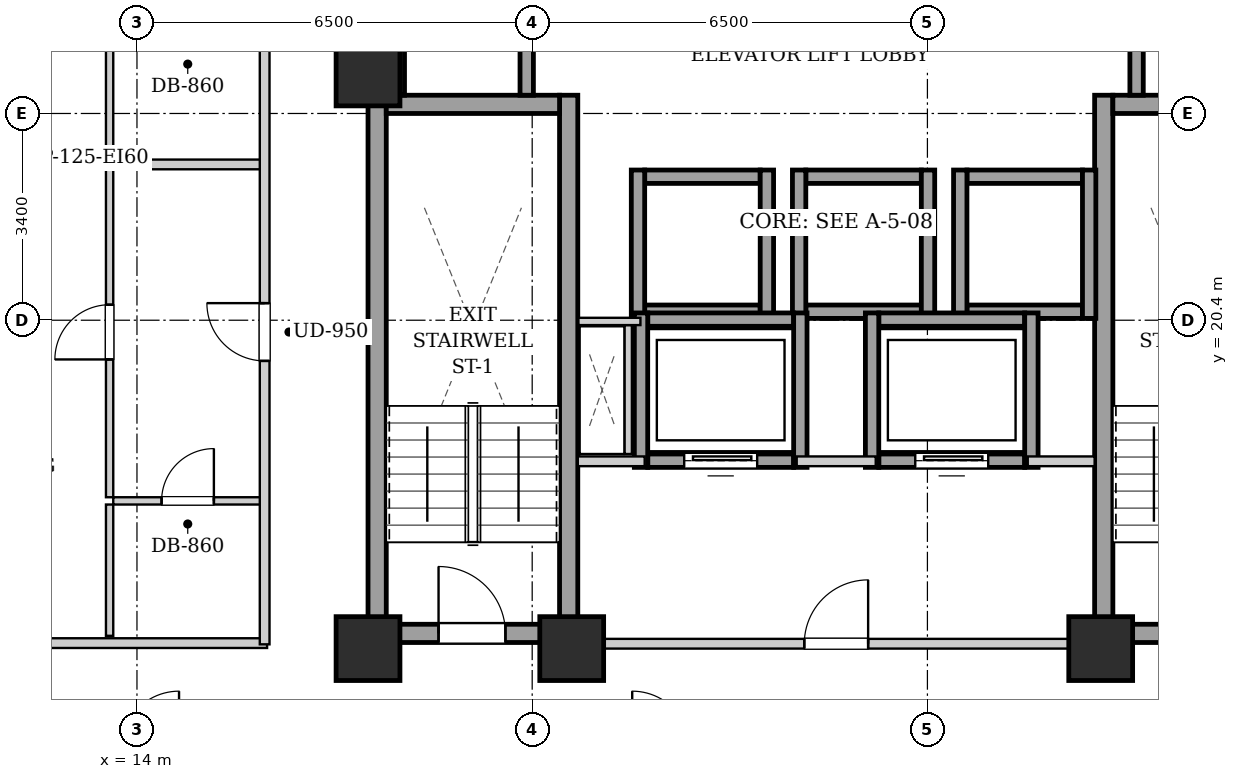
"""IFC4 building model, lengths in metres.
Left out: names, types, materials, properties, quantities, classifications, styles, units other than length and angle.
Written with IfcOpenShell. Run it as: python <this file> out.ifc"""

import sys

from ifc_helpers import new_model, si_unit, direction, frame, frame_2d, origin, origin_2d, place, context, subcontext, project, spatial, rectangle, extrude, element, fill, save


model = new_model("IFC4")
c1 = context("Model", 3, precision=1e-05, world=origin(), true_north=direction((0.0, 1.0)))
c2 = subcontext(c1, "Body", "Model", "MODEL_VIEW")
j1 = project(units=[si_unit("LENGTHUNIT", "METRE"), si_unit("PLANEANGLEUNIT", "RADIAN")], contexts=[c1])
p1 = place(None, origin())
s1 = spatial("IfcSite", under=j1, at=p1, CompositionType="ELEMENT")
p2 = place(p1, origin())
s2 = spatial("IfcBuilding", under=s1, at=p2, CompositionType="ELEMENT")
p3 = place(p2, frame((0.0, 0.0, 113.5)))
s3 = spatial("IfcBuildingStorey", under=s2, at=p3, CompositionType="ELEMENT", Elevation=113.5)
for number, where, z_axis, x_axis in (
    (1, (17.8, 15.0, 0.0), (0.0, 0.0, 1.0), (1.0, 0.0, 0.0)),
    (2, (21.15, 15.0, 0.0), (0.0, 0.0, 1.0), (1.0, 0.0, 0.0)),
    (3, (29.85, 15.0, 0.0), (0.0, 0.0, 1.0), (1.0, 0.0, 0.0)),
    (4, (17.8, 24.45, 0.0), (0.0, 0.0, 1.0), (1.0, 0.0, 0.0)),
):
    element("IfcColumn", number, at=place(p3, frame(where, z_axis=z_axis, x_axis=x_axis)), inside=s3, PredefinedType="COLUMN", context=c2, shape_type="SweptSolid", body=[
        extrude(rectangle(XDim=1.05, YDim=1.05, at=origin_2d()), origin(), (0.0, 0.0, 1.0), 3.2),
    ])
for number, where, z_axis, x_axis in (
    (5, (17.95, 15.1, 0.0), (0.0, 0.0, 1.0), (0.0, 1.0, 0.0)),
    (6, (21.1, 15.1, 0.0), (0.0, 0.0, 1.0), (0.0, 1.0, 0.0)),
):
    element("IfcWall", number, at=place(p3, frame(where, z_axis=z_axis, x_axis=x_axis)), inside=s3, PredefinedType="SHEAR", context=c2, shape_type="SweptSolid", body=[
        extrude(rectangle(XDim=9.0, YDim=0.3, at=frame_2d((4.5, 0.0))), origin(), (0.0, 0.0, 1.0), 2.94),
    ])
p4 = place(p3, frame((18.1, 23.95, 0.0), z_axis=(0.0, 0.0, 1.0), x_axis=(1.0, 0.0, 0.0)))
e7 = element("IfcWall", 7, at=p4, inside=s3, PredefinedType="SHEAR", context=c2, shape_type="SweptSolid", body=[
    extrude(rectangle(XDim=2.85, YDim=0.3, at=frame_2d((1.425, 0.0))), origin(), (0.0, 0.0, 1.0), 2.94),
])
p5 = place(p3, frame((18.1, 15.25, 0.0), z_axis=(0.0, 0.0, 1.0), x_axis=(1.0, 0.0, 0.0)))
e8 = element("IfcWall", 8, at=p5, inside=s3, PredefinedType="SHEAR", context=c2, shape_type="SweptSolid", body=[
    extrude(rectangle(XDim=2.85, YDim=0.3, at=frame_2d((1.425, 0.0))), origin(), (0.0, 0.0, 1.0), 2.94),
])
p6 = place(p5, frame((0.86, 0.0, 0.0)))
e9 = element("IfcOpeningElement", 9, at=p6, cuts=e8, PredefinedType="OPENING", context=c2, shape_type="SweptSolid", body=[
    extrude(rectangle(XDim=1.1, YDim=2.05, at=frame_2d((0.55, 1.025))), frame((0.0, 0.16, 0.0), z_axis=(0.0, -1.0, 0.0), x_axis=(1.0, 0.0, 0.0)), (0.0, 0.0, 1.0), 0.32),
])
p7 = place(p3, frame((29.9, 15.1, 0.0), z_axis=(0.0, 0.0, 1.0), x_axis=(0.0, 1.0, 0.0)))
e10 = element("IfcWall", 10, at=p7, inside=s3, PredefinedType="SHEAR", context=c2, shape_type="SweptSolid", body=[
    extrude(rectangle(XDim=9.0, YDim=0.3, at=frame_2d((4.5, 0.0))), origin(), (0.0, 0.0, 1.0), 2.94),
])
p8 = place(p3, frame((30.05, 23.95, 0.0), z_axis=(0.0, 0.0, 1.0), x_axis=(1.0, 0.0, 0.0)))
e11 = element("IfcWall", 11, at=p8, inside=s3, PredefinedType="SHEAR", context=c2, shape_type="SweptSolid", body=[
    extrude(rectangle(XDim=2.85, YDim=0.3, at=frame_2d((1.425, 0.0))), origin(), (0.0, 0.0, 1.0), 2.94),
])
p9 = place(p3, frame((30.05, 15.25, 0.0), z_axis=(0.0, 0.0, 1.0), x_axis=(1.0, 0.0, 0.0)))
e12 = element("IfcWall", 12, at=p9, inside=s3, PredefinedType="SHEAR", context=c2, shape_type="SweptSolid", body=[
    extrude(rectangle(XDim=2.85, YDim=0.3, at=frame_2d((1.425, 0.0))), origin(), (0.0, 0.0, 1.0), 2.94),
])
p10 = place(p9, frame((0.86, 0.0, 0.0)))
e13 = element("IfcOpeningElement", 13, at=p10, cuts=e12, PredefinedType="OPENING", context=c2, shape_type="SweptSolid", body=[
    extrude(rectangle(XDim=1.1, YDim=2.05, at=frame_2d((0.55, 1.025))), frame((0.0, 0.16, 0.0), z_axis=(0.0, -1.0, 0.0), x_axis=(1.0, 0.0, 0.0)), (0.0, 0.0, 1.0), 0.32),
])
for number, where, z_axis, x_axis in (
    (14, (22.35, 20.54, 0.0), (0.0, 0.0, 1.0), (1.0, 0.0, 0.0)),
    (15, (22.35, 22.76, 0.0), (0.0, 0.0, 1.0), (1.0, 0.0, 0.0)),
):
    element("IfcWall", number, at=place(p3, frame(where, z_axis=z_axis, x_axis=x_axis)), inside=s3, PredefinedType="SHEAR", context=c2, shape_type="SweptSolid", body=[
        extrude(rectangle(XDim=1.9, YDim=0.22, at=frame_2d((0.95, 0.0))), origin(), (0.0, 0.0, 1.0), 2.94),
    ])
for number, where, z_axis, x_axis in (
    (16, (22.24, 20.43, 0.0), (0.0, 0.0, 1.0), (0.0, 1.0, 0.0)),
    (17, (24.36, 20.43, 0.0), (0.0, 0.0, 1.0), (0.0, 1.0, 0.0)),
):
    element("IfcWall", number, at=place(p3, frame(where, z_axis=z_axis, x_axis=x_axis)), inside=s3, PredefinedType="SHEAR", context=c2, shape_type="SweptSolid", body=[
        extrude(rectangle(XDim=2.44, YDim=0.22, at=frame_2d((1.22, 0.0))), origin(), (0.0, 0.0, 1.0), 2.94),
    ])
for number, where, z_axis, x_axis in (
    (18, (25.0, 20.54, 0.0), (0.0, 0.0, 1.0), (1.0, 0.0, 0.0)),
    (19, (25.0, 22.76, 0.0), (0.0, 0.0, 1.0), (1.0, 0.0, 0.0)),
):
    element("IfcWall", number, at=place(p3, frame(where, z_axis=z_axis, x_axis=x_axis)), inside=s3, PredefinedType="SHEAR", context=c2, shape_type="SweptSolid", body=[
        extrude(rectangle(XDim=1.9, YDim=0.22, at=frame_2d((0.95, 0.0))), origin(), (0.0, 0.0, 1.0), 2.94),
    ])
for number, where, z_axis, x_axis in (
    (20, (24.89, 20.43, 0.0), (0.0, 0.0, 1.0), (0.0, 1.0, 0.0)),
    (21, (27.01, 20.43, 0.0), (0.0, 0.0, 1.0), (0.0, 1.0, 0.0)),
):
    element("IfcWall", number, at=place(p3, frame(where, z_axis=z_axis, x_axis=x_axis)), inside=s3, PredefinedType="SHEAR", context=c2, shape_type="SweptSolid", body=[
        extrude(rectangle(XDim=2.44, YDim=0.22, at=frame_2d((1.22, 0.0))), origin(), (0.0, 0.0, 1.0), 2.94),
    ])
for number, where, z_axis, x_axis in (
    (22, (27.65, 20.54, 0.0), (0.0, 0.0, 1.0), (1.0, 0.0, 0.0)),
    (23, (27.65, 22.76, 0.0), (0.0, 0.0, 1.0), (1.0, 0.0, 0.0)),
):
    element("IfcWall", number, at=place(p3, frame(where, z_axis=z_axis, x_axis=x_axis)), inside=s3, PredefinedType="SHEAR", context=c2, shape_type="SweptSolid", body=[
        extrude(rectangle(XDim=1.9, YDim=0.22, at=frame_2d((0.95, 0.0))), origin(), (0.0, 0.0, 1.0), 2.94),
    ])
for number, where, z_axis, x_axis in (
    (24, (27.54, 20.43, 0.0), (0.0, 0.0, 1.0), (0.0, 1.0, 0.0)),
    (25, (29.66, 20.43, 0.0), (0.0, 0.0, 1.0), (0.0, 1.0, 0.0)),
):
    element("IfcWall", number, at=place(p3, frame(where, z_axis=z_axis, x_axis=x_axis)), inside=s3, PredefinedType="SHEAR", context=c2, shape_type="SweptSolid", body=[
        extrude(rectangle(XDim=2.44, YDim=0.22, at=frame_2d((1.22, 0.0))), origin(), (0.0, 0.0, 1.0), 2.94),
    ])
p11 = place(p3, frame((18.29, 24.1, 0.0), z_axis=(0.0, 0.0, 1.0), x_axis=(0.0, 1.0, 0.0)))
e26 = element("IfcWall", 26, at=p11, inside=s3, PredefinedType="SHEAR", context=c2, shape_type="SweptSolid", body=[
    extrude(rectangle(XDim=4.14, YDim=0.22, at=frame_2d((2.07, 0.0))), origin(), (0.0, 0.0, 1.0), 2.94),
])
p12 = place(p3, frame((20.41, 24.1, 0.0), z_axis=(0.0, 0.0, 1.0), x_axis=(0.0, 1.0, 0.0)))
e27 = element("IfcWall", 27, at=p12, inside=s3, PredefinedType="SHEAR", context=c2, shape_type="SweptSolid", body=[
    extrude(rectangle(XDim=1.96, YDim=0.22, at=frame_2d((0.98, 0.0))), origin(), (0.0, 0.0, 1.0), 2.94),
])
p13 = place(p3, frame((30.44, 24.1, 0.0), z_axis=(0.0, 0.0, 1.0), x_axis=(0.0, 1.0, 0.0)))
e28 = element("IfcWall", 28, at=p13, inside=s3, PredefinedType="SHEAR", context=c2, shape_type="SweptSolid", body=[
    extrude(rectangle(XDim=2.07, YDim=0.22, at=frame_2d((1.035, 0.0))), origin(), (0.0, 0.0, 1.0), 2.94),
])
p14 = place(p3, frame((22.4, 18.09, 0.0), z_axis=(0.0, 0.0, 1.0), x_axis=(1.0, 0.0, 0.0)))
e29 = element("IfcWall", 29, at=p14, inside=s3, PredefinedType="SHEAR", context=c2, shape_type="SweptSolid", body=[
    extrude(rectangle(XDim=2.4, YDim=0.22, at=frame_2d((1.2, 0.0))), origin(), (0.0, 0.0, 1.0), 2.94),
])
p15 = place(p14, frame((0.6, 0.0, 0.0)))
e30 = element("IfcOpeningElement", 30, at=p15, cuts=e29, PredefinedType="OPENING", context=c2, shape_type="SweptSolid", body=[
    extrude(rectangle(XDim=1.2, YDim=2.15, at=frame_2d((0.6, 1.075))), frame((0.0, 0.12, 0.0), z_axis=(0.0, -1.0, 0.0), x_axis=(1.0, 0.0, 0.0)), (0.0, 0.0, 1.0), 0.24),
])
p16 = place(p3, frame((22.4, 20.41, 0.0), z_axis=(0.0, 0.0, 1.0), x_axis=(1.0, 0.0, 0.0)))
e31 = element("IfcWall", 31, at=p16, inside=s3, PredefinedType="SHEAR", context=c2, shape_type="SweptSolid", body=[
    extrude(rectangle(XDim=2.4, YDim=0.22, at=frame_2d((1.2, 0.0))), origin(), (0.0, 0.0, 1.0), 2.94),
])
for number, where, z_axis, x_axis in (
    (32, (22.29, 17.98, 0.0), (0.0, 0.0, 1.0), (0.0, 1.0, 0.0)),
    (33, (24.91, 17.98, 0.0), (0.0, 0.0, 1.0), (0.0, 1.0, 0.0)),
):
    element("IfcWall", number, at=place(p3, frame(where, z_axis=z_axis, x_axis=x_axis)), inside=s3, PredefinedType="SHEAR", context=c2, shape_type="SweptSolid", body=[
        extrude(rectangle(XDim=2.54, YDim=0.22, at=frame_2d((1.27, 0.0))), origin(), (0.0, 0.0, 1.0), 2.94),
    ])
p17 = place(p3, frame((26.2, 18.09, 0.0), z_axis=(0.0, 0.0, 1.0), x_axis=(1.0, 0.0, 0.0)))
e34 = element("IfcWall", 34, at=p17, inside=s3, PredefinedType="SHEAR", context=c2, shape_type="SweptSolid", body=[
    extrude(rectangle(XDim=2.4, YDim=0.22, at=frame_2d((1.2, 0.0))), origin(), (0.0, 0.0, 1.0), 2.94),
])
p18 = place(p17, frame((0.6, 0.0, 0.0)))
e35 = element("IfcOpeningElement", 35, at=p18, cuts=e34, PredefinedType="OPENING", context=c2, shape_type="SweptSolid", body=[
    extrude(rectangle(XDim=1.2, YDim=2.15, at=frame_2d((0.6, 1.075))), frame((0.0, 0.12, 0.0), z_axis=(0.0, -1.0, 0.0), x_axis=(1.0, 0.0, 0.0)), (0.0, 0.0, 1.0), 0.24),
])
p19 = place(p3, frame((26.2, 20.41, 0.0), z_axis=(0.0, 0.0, 1.0), x_axis=(1.0, 0.0, 0.0)))
e36 = element("IfcWall", 36, at=p19, inside=s3, PredefinedType="SHEAR", context=c2, shape_type="SweptSolid", body=[
    extrude(rectangle(XDim=2.4, YDim=0.22, at=frame_2d((1.2, 0.0))), origin(), (0.0, 0.0, 1.0), 2.94),
])
for number, where, z_axis, x_axis in (
    (37, (26.09, 17.98, 0.0), (0.0, 0.0, 1.0), (0.0, 1.0, 0.0)),
    (38, (28.71, 17.98, 0.0), (0.0, 0.0, 1.0), (0.0, 1.0, 0.0)),
):
    element("IfcWall", number, at=place(p3, frame(where, z_axis=z_axis, x_axis=x_axis)), inside=s3, PredefinedType="SHEAR", context=c2, shape_type="SweptSolid", body=[
        extrude(rectangle(XDim=2.54, YDim=0.22, at=frame_2d((1.27, 0.0))), origin(), (0.0, 0.0, 1.0), 2.94),
    ])
p20 = place(p3, frame((21.25, 15.08, 0.0), z_axis=(0.0, 0.0, 1.0), x_axis=(1.0, 0.0, 0.0)))
e39 = element("IfcWall", 39, at=p20, inside=s3, PredefinedType="PARTITIONING", context=c2, shape_type="SweptSolid", body=[
    extrude(rectangle(XDim=8.5, YDim=0.16, at=frame_2d((4.25, 0.0))), origin(), (0.0, 0.0, 1.0), 2.313),
])
p21 = place(p20, frame((3.725, 0.0, 0.0)))
e40 = element("IfcOpeningElement", 40, at=p21, cuts=e39, PredefinedType="OPENING", context=c2, shape_type="SweptSolid", body=[
    extrude(rectangle(XDim=1.05, YDim=2.05, at=frame_2d((0.525, 1.025))), frame((0.0, 0.09, 0.0), z_axis=(0.0, -1.0, 0.0), x_axis=(1.0, 0.0, 0.0)), (0.0, 0.0, 1.0), 0.18),
])
p22 = place(p3, frame((21.25, 18.08, 0.0), z_axis=(0.0, 0.0, 1.0), x_axis=(1.0, 0.0, 0.0)))
e41 = element("IfcWall", 41, at=p22, inside=s3, PredefinedType="PARTITIONING", context=c2, shape_type="SweptSolid", body=[
    extrude(rectangle(XDim=1.1, YDim=0.16, at=frame_2d((0.55, 0.0))), origin(), (0.0, 0.0, 1.0), 2.94),
])
p23 = place(p3, frame((24.85, 18.08, 0.0), z_axis=(0.0, 0.0, 1.0), x_axis=(1.0, 0.0, 0.0)))
e42 = element("IfcWall", 42, at=p23, inside=s3, PredefinedType="PARTITIONING", context=c2, shape_type="SweptSolid", body=[
    extrude(rectangle(XDim=1.3, YDim=0.16, at=frame_2d((0.65, 0.0))), origin(), (0.0, 0.0, 1.0), 2.94),
])
p24 = place(p3, frame((28.65, 18.08, 0.0), z_axis=(0.0, 0.0, 1.0), x_axis=(1.0, 0.0, 0.0)))
e43 = element("IfcWall", 43, at=p24, inside=s3, PredefinedType="PARTITIONING", context=c2, shape_type="SweptSolid", body=[
    extrude(rectangle(XDim=1.1, YDim=0.16, at=frame_2d((0.55, 0.0))), origin(), (0.0, 0.0, 1.0), 2.94),
])
p25 = place(p3, frame((17.88, 24.12, 0.0), z_axis=(0.0, 0.0, 1.0), x_axis=(0.0, 1.0, 0.0)))
e44 = element("IfcWall", 44, at=p25, inside=s3, PredefinedType="PARTITIONING", context=c2, shape_type="SweptSolid", body=[
    extrude(rectangle(XDim=4.76, YDim=0.16, at=frame_2d((2.38, 0.0))), origin(), (0.0, 0.0, 1.0), 2.94),
])
p26 = place(p3, frame((22.08, 18.2, 0.0), z_axis=(0.0, 0.0, 1.0), x_axis=(0.0, 1.0, 0.0)))
e45 = element("IfcWall", 45, at=p26, inside=s3, PredefinedType="PARTITIONING", context=c2, shape_type="SweptSolid", body=[
    extrude(rectangle(XDim=2.12, YDim=0.12, at=frame_2d((1.06, 0.0))), origin(), (0.0, 0.0, 1.0), 2.94),
])
p27 = place(p3, frame((22.28, 20.38, 0.0), z_axis=(0.0, 0.0, 1.0), x_axis=(-1.0, 0.0, 0.0)))
e46 = element("IfcWall", 46, at=p27, inside=s3, PredefinedType="PARTITIONING", context=c2, shape_type="SweptSolid", body=[
    extrude(rectangle(XDim=1.02, YDim=0.12, at=frame_2d((0.51, 0.0))), origin(), (0.0, 0.0, 1.0), 2.94),
])
p28 = place(p3, frame((7.78, 15.09, 0.0), z_axis=(0.0, 0.0, 1.0), x_axis=(1.0, 0.0, 0.0)))
e47 = element("IfcWall", 47, at=p28, inside=s3, PredefinedType="PARTITIONING", context=c2, shape_type="SweptSolid", body=[
    extrude(rectangle(XDim=8.36, YDim=0.16, at=frame_2d((4.18, 0.0))), origin(), (0.0, 0.0, 1.0), 2.313),
])
p29 = place(p3, frame((7.78, 22.962, 0.0), z_axis=(0.0, 0.0, 1.0), x_axis=(1.0, 0.0, 0.0)))
e48 = element("IfcWall", 48, at=p29, inside=s3, PredefinedType="PARTITIONING", context=c2, shape_type="SweptSolid", body=[
    extrude(rectangle(XDim=8.28, YDim=0.16, at=frame_2d((4.14, 0.0))), origin(), (0.0, 0.0, 1.0), 2.94),
])
p30 = place(p3, frame((13.61, 17.429, 0.0), z_axis=(0.0, 0.0, 1.0), x_axis=(1.0, 0.0, 0.0)))
e49 = element("IfcWall", 49, at=p30, inside=s3, PredefinedType="PARTITIONING", context=c2, shape_type="SweptSolid", body=[
    extrude(rectangle(XDim=2.45, YDim=0.12, at=frame_2d((1.225, 0.0))), origin(), (0.0, 0.0, 1.0), 2.94),
])
p31 = place(p30, frame((0.795, 0.0, 0.0)))
e50 = element("IfcOpeningElement", 50, at=p31, cuts=e49, PredefinedType="OPENING", context=c2, shape_type="SweptSolid", body=[
    extrude(rectangle(XDim=0.86, YDim=2.05, at=frame_2d((0.43, 1.025))), frame((0.0, 0.07, 0.0), z_axis=(0.0, -1.0, 0.0), x_axis=(1.0, 0.0, 0.0)), (0.0, 0.0, 1.0), 0.14),
])
p32 = place(p3, frame((13.55, 15.21, 0.0), z_axis=(0.0, 0.0, 1.0), x_axis=(0.0, 1.0, 0.0)))
e51 = element("IfcWall", 51, at=p32, inside=s3, PredefinedType="PARTITIONING", context=c2, shape_type="SweptSolid", body=[
    extrude(rectangle(XDim=2.159, YDim=0.12, at=frame_2d((1.08, 0.0))), origin(), (0.0, 0.0, 1.0), 2.94),
])
p33 = place(p3, frame((13.55, 17.489, 0.0), z_axis=(0.0, 0.0, 1.0), x_axis=(0.0, 1.0, 0.0)))
e52 = element("IfcWall", 52, at=p33, inside=s3, PredefinedType="PARTITIONING", context=c2, shape_type="SweptSolid", body=[
    extrude(rectangle(XDim=5.433, YDim=0.12, at=frame_2d((2.717, 0.0))), origin(), (0.0, 0.0, 1.0), 2.94),
])
p34 = place(p33, frame((2.266, 0.0, 0.0)))
e53 = element("IfcOpeningElement", 53, at=p34, cuts=e52, PredefinedType="OPENING", context=c2, shape_type="SweptSolid", body=[
    extrude(rectangle(XDim=0.9, YDim=2.05, at=frame_2d((0.45, 1.025))), frame((0.0, 0.07, 0.0), z_axis=(0.0, -1.0, 0.0), x_axis=(1.0, 0.0, 0.0)), (0.0, 0.0, 1.0), 0.14),
])
p35 = place(p3, frame((13.55, 23.082, 0.0), z_axis=(0.0, 0.0, 1.0), x_axis=(0.0, 1.0, 0.0)))
e54 = element("IfcWall", 54, at=p35, inside=s3, PredefinedType="PARTITIONING", context=c2, shape_type="SweptSolid", body=[
    extrude(rectangle(XDim=1.85, YDim=0.12, at=frame_2d((0.925, 0.0))), origin(), (0.0, 0.0, 1.0), 2.94),
])
p36 = place(p3, frame((16.1, 15.07, 0.0), z_axis=(0.0, 0.0, 1.0), x_axis=(0.0, 1.0, 0.0)))
e55 = element("IfcWall", 55, at=p36, inside=s3, PredefinedType="PARTITIONING", context=c2, shape_type="SweptSolid", body=[
    extrude(rectangle(XDim=13.93, YDim=0.16, at=frame_2d((6.965, 0.0))), origin(), (0.0, 0.0, 1.0), 2.94),
])
p37 = place(p36, frame((4.661, 0.0, 0.0)))
e56 = element("IfcOpeningElement", 56, at=p37, cuts=e55, PredefinedType="OPENING", context=c2, shape_type="SweptSolid", body=[
    extrude(rectangle(XDim=0.95, YDim=2.1, at=frame_2d((0.475, 1.05))), frame((0.0, 0.09, 0.0), z_axis=(0.0, -1.0, 0.0), x_axis=(1.0, 0.0, 0.0)), (0.0, 0.0, 1.0), 0.18),
])
p38 = place(p36, frame((11.411, 0.0, 0.0)))
e57 = element("IfcOpeningElement", 57, at=p38, cuts=e55, PredefinedType="OPENING", context=c2, shape_type="SweptSolid", body=[
    extrude(rectangle(XDim=0.95, YDim=2.1, at=frame_2d((0.475, 1.05))), frame((0.0, 0.09, 0.0), z_axis=(0.0, -1.0, 0.0), x_axis=(1.0, 0.0, 0.0)), (0.0, 0.0, 1.0), 0.18),
])
p39 = place(p6, origin())
e58 = element("IfcDoor", 58, at=p39, inside=s3, OperationType="SINGLE_SWING_LEFT", PredefinedType="DOOR", context=c2, shape_type="SweptSolid", body=[
    extrude(rectangle(XDim=1.1, YDim=2.05, at=frame_2d((0.55, 1.025))), frame((0.0, 0.025, 0.0), z_axis=(0.0, -1.0, 0.0), x_axis=(1.0, 0.0, 0.0)), (0.0, 0.0, 1.0), 0.05),
])
fill(e9, e58)
p40 = place(p15, origin())
e59 = element("IfcDoor", 59, at=p40, inside=s3, OperationType="SLIDING_TO_LEFT", PredefinedType="DOOR", context=c2, shape_type="SweptSolid", body=[
    extrude(rectangle(XDim=1.2, YDim=2.15, at=frame_2d((0.6, 1.075))), frame((0.0, 0.025, 0.0), z_axis=(0.0, -1.0, 0.0), x_axis=(1.0, 0.0, 0.0)), (0.0, 0.0, 1.0), 0.05),
])
fill(e30, e59)
p41 = place(p18, origin())
e60 = element("IfcDoor", 60, at=p41, inside=s3, OperationType="SLIDING_TO_LEFT", PredefinedType="DOOR", context=c2, shape_type="SweptSolid", body=[
    extrude(rectangle(XDim=1.2, YDim=2.15, at=frame_2d((0.6, 1.075))), frame((0.0, 0.025, 0.0), z_axis=(0.0, -1.0, 0.0), x_axis=(1.0, 0.0, 0.0)), (0.0, 0.0, 1.0), 0.05),
])
fill(e35, e60)
p42 = place(p21, origin())
e61 = element("IfcDoor", 61, at=p42, inside=s3, OperationType="SINGLE_SWING_RIGHT", PredefinedType="DOOR", context=c2, shape_type="SweptSolid", body=[
    extrude(rectangle(XDim=1.05, YDim=2.05, at=frame_2d((0.525, 1.025))), frame((0.0, 0.025, 0.0), z_axis=(0.0, -1.0, 0.0), x_axis=(1.0, 0.0, 0.0)), (0.0, 0.0, 1.0), 0.05),
])
fill(e40, e61)
p43 = place(p31, origin())
e62 = element("IfcDoor", 62, at=p43, inside=s3, OperationType="SINGLE_SWING_RIGHT", PredefinedType="DOOR", context=c2, shape_type="SweptSolid", body=[
    extrude(rectangle(XDim=0.86, YDim=2.05, at=frame_2d((0.43, 1.025))), frame((0.0, 0.025, 0.0), z_axis=(0.0, -1.0, 0.0), x_axis=(1.0, 0.0, 0.0)), (0.0, 0.0, 1.0), 0.05),
])
fill(e50, e62)
p44 = place(p34, origin())
e63 = element("IfcDoor", 63, at=p44, inside=s3, OperationType="SINGLE_SWING_LEFT", PredefinedType="DOOR", context=c2, shape_type="SweptSolid", body=[
    extrude(rectangle(XDim=0.9, YDim=2.05, at=frame_2d((0.45, 1.025))), frame((0.0, 0.025, 0.0), z_axis=(0.0, -1.0, 0.0), x_axis=(1.0, 0.0, 0.0)), (0.0, 0.0, 1.0), 0.05),
])
fill(e53, e63)
p45 = place(p37, origin())
e64 = element("IfcDoor", 64, at=p45, inside=s3, OperationType="SINGLE_SWING_RIGHT", PredefinedType="DOOR", context=c2, shape_type="SweptSolid", body=[
    extrude(rectangle(XDim=0.95, YDim=2.1, at=frame_2d((0.475, 1.05))), frame((0.0, 0.025, 0.0), z_axis=(0.0, -1.0, 0.0), x_axis=(1.0, 0.0, 0.0)), (0.0, 0.0, 1.0), 0.05),
])
fill(e56, e64)
save(model, sys.argv[1])
